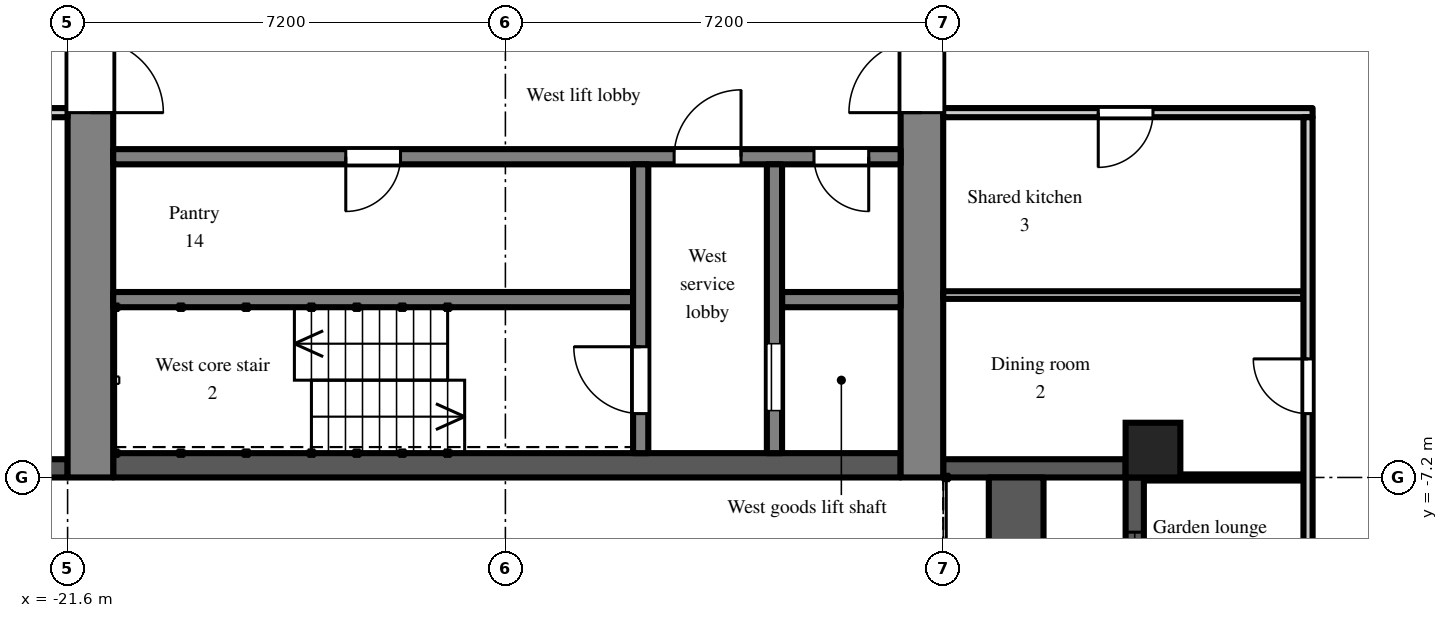
"""IFC4 building model, lengths in metres.
Left out: names, types, materials, properties, quantities, classifications, styles, units other than length and angle.
Written with IfcOpenShell. Run it as: python <this file> out.ifc"""

import sys

from ifc_helpers import new_model, si_unit, direction, frame, frame_2d, origin, origin_2d, place, context, subcontext, project, spatial, rectangle, extrude, element, fill, save


model = new_model("IFC4")
c1 = context("Model", 3, precision=1e-05, world=origin(), true_north=direction((0.0, 1.0)))
c2 = subcontext(c1, "Body", "Model", "MODEL_VIEW")
j1 = project(units=[si_unit("LENGTHUNIT", "METRE"), si_unit("PLANEANGLEUNIT", "RADIAN")], contexts=[c1])
p1 = place(None, origin())
s1 = spatial("IfcSite", under=j1, at=p1, CompositionType="ELEMENT")
p2 = place(p1, origin())
s2 = spatial("IfcBuilding", under=s1, at=p2, CompositionType="ELEMENT")
p3 = place(p2, frame((0.0, 0.0, 216.9)))
s3 = spatial("IfcBuildingStorey", under=s2, at=p3, CompositionType="ELEMENT", Elevation=216.9)
p4 = place(p3, frame((-3.75, -6.75, 0.0), z_axis=(0.0, 0.0, 1.0), x_axis=(1.0, 0.0, 0.0)))
e1 = element("IfcColumn", 1, at=p4, inside=s3, PredefinedType="COLUMN", context=c2, shape_type="SweptSolid", body=[
    extrude(rectangle(XDim=0.9, YDim=0.9, at=origin_2d()), origin(), (0.0, 0.0, 1.0), 3.0),
])
p5 = place(p3, frame((-24.3, -7.05, 0.0), z_axis=(0.0, 0.0, 1.0), x_axis=(1.0, 0.0, 0.0)))
e2 = element("IfcWall", 2, at=p5, inside=s3, PredefinedType="SOLIDWALL", context=c2, shape_type="SweptSolid", body=[
    extrude(rectangle(XDim=2.7, YDim=0.3, at=frame_2d((1.35, 0.0))), origin(), (0.0, 0.0, 1.0), 2.3),
])
p6 = place(p5, frame((0.75, 0.0, 0.2)))
e3 = element("IfcOpeningElement", 3, at=p6, cuts=e2, PredefinedType="OPENING", context=c2, shape_type="SweptSolid", body=[
    extrude(rectangle(XDim=1.2, YDim=1.85, at=frame_2d((0.6, 0.925))), frame((0.0, 0.16, 0.0), z_axis=(0.0, -1.0, 0.0), x_axis=(1.0, 0.0, 0.0)), (0.0, 0.0, 1.0), 0.32),
])
p7 = place(p3, frame((-7.2, -7.05, 0.0), z_axis=(0.0, 0.0, 1.0), x_axis=(1.0, 0.0, 0.0)))
e4 = element("IfcWall", 4, at=p7, inside=s3, PredefinedType="SOLIDWALL", context=c2, shape_type="SweptSolid", body=[
    extrude(rectangle(XDim=3.0, YDim=0.3, at=frame_2d((1.5, 0.0))), origin(), (0.0, 0.0, 1.0), 2.3),
])
p8 = place(p3, frame((-4.05, -7.2, 0.0), z_axis=(0.0, 0.0, 1.0), x_axis=(0.0, -1.0, 0.0)))
e5 = element("IfcWall", 5, at=p8, inside=s3, PredefinedType="SOLIDWALL", context=c2, shape_type="SweptSolid", body=[
    extrude(rectangle(XDim=7.2, YDim=0.3, at=frame_2d((3.6, 0.0))), origin(), (0.0, 0.0, 1.0), 2.3),
])
p9 = place(p8, frame((3.0, 0.0, 0.0)))
e6 = element("IfcOpeningElement", 6, at=p9, cuts=e5, PredefinedType="OPENING", context=c2, shape_type="SweptSolid", body=[
    extrude(rectangle(XDim=1.2, YDim=2.05, at=frame_2d((0.6, 1.025))), frame((0.0, 0.16, 0.0), z_axis=(0.0, -1.0, 0.0), x_axis=(1.0, 0.0, 0.0)), (0.0, 0.0, 1.0), 0.32),
])
p10 = place(p8, frame((0.9, 0.0, 0.2)))
e7 = element("IfcOpeningElement", 7, at=p10, cuts=e5, PredefinedType="OPENING", context=c2, shape_type="SweptSolid", body=[
    extrude(rectangle(XDim=1.8, YDim=1.85, at=frame_2d((0.9, 0.925))), frame((0.0, 0.16, 0.0), z_axis=(0.0, -1.0, 0.0), x_axis=(1.0, 0.0, 0.0)), (0.0, 0.0, 1.0), 0.32),
])
p11 = place(p8, frame((4.5, 0.0, 0.2)))
e8 = element("IfcOpeningElement", 8, at=p11, cuts=e5, PredefinedType="OPENING", context=c2, shape_type="SweptSolid", body=[
    extrude(rectangle(XDim=1.8, YDim=1.85, at=frame_2d((0.9, 0.925))), frame((0.0, 0.16, 0.0), z_axis=(0.0, -1.0, 0.0), x_axis=(1.0, 0.0, 0.0)), (0.0, 0.0, 1.0), 0.32),
])
p12 = place(p3, frame((-6.0, -14.4, 0.0), z_axis=(0.0, 0.0, 1.0), x_axis=(0.0, 1.0, 0.0)))
e9 = element("IfcWall", 9, at=p12, inside=s3, PredefinedType="PARAPET", context=c2, shape_type="SweptSolid", body=[
    extrude(rectangle(XDim=7.2, YDim=0.9, at=frame_2d((3.6, 0.0))), origin(), (0.0, 0.0, 1.0), 0.8),
])
p13 = place(p3, frame((-7.55, -7.2, 0.0), z_axis=(0.0, 0.0, 1.0), x_axis=(0.0, 1.0, 0.0)))
e10 = element("IfcWall", 10, at=p13, inside=s3, PredefinedType="SHEAR", context=c2, shape_type="SweptSolid", body=[
    extrude(rectangle(XDim=14.4, YDim=0.7, at=frame_2d((7.2, 0.0))), origin(), (0.0, 0.0, 1.0), 2.6),
])
p14 = place(p13, frame((6.0, 0.0, 0.0)))
e11 = element("IfcOpeningElement", 11, at=p14, cuts=e10, PredefinedType="OPENING", context=c2, shape_type="SweptSolid", body=[
    extrude(rectangle(XDim=2.4, YDim=2.2, at=frame_2d((1.2, 1.1))), frame((0.0, 0.36, 0.0), z_axis=(0.0, -1.0, 0.0), x_axis=(1.0, 0.0, 0.0)), (0.0, 0.0, 1.0), 0.72),
])
p15 = place(p3, frame((-21.225, -7.2, 0.0), z_axis=(0.0, 0.0, 1.0), x_axis=(0.0, 1.0, 0.0)))
e12 = element("IfcWall", 12, at=p15, inside=s3, PredefinedType="SHEAR", context=c2, shape_type="SweptSolid", body=[
    extrude(rectangle(XDim=14.4, YDim=0.75, at=frame_2d((7.2, 0.0))), origin(), (0.0, 0.0, 1.0), 2.6),
])
p16 = place(p15, frame((6.0, 0.0, 0.0)))
e13 = element("IfcOpeningElement", 13, at=p16, cuts=e12, PredefinedType="OPENING", context=c2, shape_type="SweptSolid", body=[
    extrude(rectangle(XDim=2.4, YDim=2.2, at=frame_2d((1.2, 1.1))), frame((0.0, 0.385, 0.0), z_axis=(0.0, -1.0, 0.0), x_axis=(1.0, 0.0, 0.0)), (0.0, 0.0, 1.0), 0.77),
])
p17 = place(p3, frame((-7.9, -7.0, 0.0), z_axis=(0.0, 0.0, 1.0), x_axis=(-1.0, 0.0, 0.0)))
e14 = element("IfcWall", 14, at=p17, inside=s3, PredefinedType="SHEAR", context=c2, shape_type="SweptSolid", body=[
    extrude(rectangle(XDim=12.95, YDim=0.4, at=frame_2d((6.475, 0.0))), origin(), (0.0, 0.0, 1.0), 2.6),
])
p18 = place(p3, frame((-7.9, -1.925, 0.0), z_axis=(0.0, 0.0, 1.0), x_axis=(-1.0, 0.0, 0.0)))
e15 = element("IfcWall", 15, at=p18, inside=s3, PredefinedType="SHEAR", context=c2, shape_type="SweptSolid", body=[
    extrude(rectangle(XDim=12.95, YDim=0.25, at=frame_2d((6.475, 0.0))), origin(), (0.0, 0.0, 1.0), 2.6),
])
p19 = place(p18, frame((0.525, 0.0, 0.0)))
e16 = element("IfcOpeningElement", 16, at=p19, cuts=e15, PredefinedType="OPENING", context=c2, shape_type="SweptSolid", body=[
    extrude(rectangle(XDim=0.9, YDim=2.1, at=frame_2d((0.45, 1.05))), frame((0.0, 0.135, 0.0), z_axis=(0.0, -1.0, 0.0), x_axis=(1.0, 0.0, 0.0)), (0.0, 0.0, 1.0), 0.27),
])
p20 = place(p18, frame((2.625, 0.0, 0.0)))
e17 = element("IfcOpeningElement", 17, at=p20, cuts=e15, PredefinedType="OPENING", context=c2, shape_type="SweptSolid", body=[
    extrude(rectangle(XDim=1.1, YDim=2.1, at=frame_2d((0.55, 1.05))), frame((0.0, 0.135, 0.0), z_axis=(0.0, -1.0, 0.0), x_axis=(1.0, 0.0, 0.0)), (0.0, 0.0, 1.0), 0.27),
])
p21 = place(p18, frame((8.225, 0.0, 0.0)))
e18 = element("IfcOpeningElement", 18, at=p21, cuts=e15, PredefinedType="OPENING", context=c2, shape_type="SweptSolid", body=[
    extrude(rectangle(XDim=0.9, YDim=2.1, at=frame_2d((0.45, 1.05))), frame((0.0, 0.135, 0.0), z_axis=(0.0, -1.0, 0.0), x_axis=(1.0, 0.0, 0.0)), (0.0, 0.0, 1.0), 0.27),
])
p22 = place(p3, frame((-7.9, -4.275, 0.0), z_axis=(0.0, 0.0, 1.0), x_axis=(-1.0, 0.0, 0.0)))
e19 = element("IfcWall", 19, at=p22, inside=s3, PredefinedType="SHEAR", context=c2, shape_type="SweptSolid", body=[
    extrude(rectangle(XDim=1.95, YDim=0.25, at=frame_2d((0.975, 0.0))), origin(), (0.0, 0.0, 1.0), 2.6),
])
p23 = place(p3, frame((-12.3, -4.275, 0.0), z_axis=(0.0, 0.0, 1.0), x_axis=(-1.0, 0.0, 0.0)))
e20 = element("IfcWall", 20, at=p23, inside=s3, PredefinedType="SHEAR", context=c2, shape_type="SweptSolid", body=[
    extrude(rectangle(XDim=8.55, YDim=0.25, at=frame_2d((4.275, 0.0))), origin(), (0.0, 0.0, 1.0), 2.6),
])
p24 = place(p3, frame((-9.975, -2.05, 0.0), z_axis=(0.0, 0.0, 1.0), x_axis=(0.0, -1.0, 0.0)))
e21 = element("IfcWall", 21, at=p24, inside=s3, PredefinedType="SHEAR", context=c2, shape_type="SweptSolid", body=[
    extrude(rectangle(XDim=4.75, YDim=0.25, at=frame_2d((2.375, 0.0))), origin(), (0.0, 0.0, 1.0), 2.6),
])
p25 = place(p24, frame((2.95, 0.0, 0.0)))
e22 = element("IfcOpeningElement", 22, at=p25, cuts=e21, PredefinedType="OPENING", context=c2, shape_type="SweptSolid", body=[
    extrude(rectangle(XDim=1.1, YDim=2.1, at=frame_2d((0.55, 1.05))), frame((0.0, 0.135, 0.0), z_axis=(0.0, -1.0, 0.0), x_axis=(1.0, 0.0, 0.0)), (0.0, 0.0, 1.0), 0.27),
])
p26 = place(p3, frame((-12.175, -2.05, 0.0), z_axis=(0.0, 0.0, 1.0), x_axis=(0.0, -1.0, 0.0)))
e23 = element("IfcWall", 23, at=p26, inside=s3, PredefinedType="SHEAR", context=c2, shape_type="SweptSolid", body=[
    extrude(rectangle(XDim=4.75, YDim=0.25, at=frame_2d((2.375, 0.0))), origin(), (0.0, 0.0, 1.0), 2.6),
])
p27 = place(p26, frame((3.0, 0.0, 0.0)))
e24 = element("IfcOpeningElement", 24, at=p27, cuts=e23, PredefinedType="OPENING", context=c2, shape_type="SweptSolid", body=[
    extrude(rectangle(XDim=1.1, YDim=2.1, at=frame_2d((0.55, 1.05))), frame((0.0, 0.135, 0.0), z_axis=(0.0, -1.0, 0.0), x_axis=(1.0, 0.0, 0.0)), (0.0, 0.0, 1.0), 0.27),
])
p28 = place(p3, frame((-26.725, -1.2, 0.0), z_axis=(0.0, 0.0, 1.0), x_axis=(1.0, 0.0, 0.0)))
e25 = element("IfcWall", 25, at=p28, inside=s3, PredefinedType="PARTITIONING", context=c2, shape_type="SweptSolid", body=[
    extrude(rectangle(XDim=5.125, YDim=0.15, at=frame_2d((2.562, 0.0))), origin(), (0.0, 0.0, 1.0), 2.6),
])
p29 = place(p28, frame((1.625, 0.0, 0.0)))
e26 = element("IfcOpeningElement", 26, at=p29, cuts=e25, PredefinedType="OPENING", context=c2, shape_type="SweptSolid", body=[
    extrude(rectangle(XDim=1.8, YDim=2.1, at=frame_2d((0.9, 1.05))), frame((0.0, 0.085, 0.0), z_axis=(0.0, -1.0, 0.0), x_axis=(1.0, 0.0, 0.0)), (0.0, 0.0, 1.0), 0.17),
])
p30 = place(p3, frame((-7.2, -4.2, 0.0), z_axis=(0.0, 0.0, 1.0), x_axis=(1.0, 0.0, 0.0)))
e27 = element("IfcWall", 27, at=p30, inside=s3, PredefinedType="PARTITIONING", context=c2, shape_type="SweptSolid", body=[
    extrude(rectangle(XDim=5.925, YDim=0.125, at=frame_2d((2.962, 0.0))), origin(), (0.0, 0.0, 1.0), 2.6),
])
p31 = place(p3, frame((-7.2, -1.2, 0.0), z_axis=(0.0, 0.0, 1.0), x_axis=(1.0, 0.0, 0.0)))
e28 = element("IfcWall", 28, at=p31, inside=s3, PredefinedType="PARTITIONING", context=c2, shape_type="SweptSolid", body=[
    extrude(rectangle(XDim=6.075, YDim=0.15, at=frame_2d((3.038, 0.0))), origin(), (0.0, 0.0, 1.0), 2.6),
])
p32 = place(p31, frame((2.55, 0.0, 0.0)))
e29 = element("IfcOpeningElement", 29, at=p32, cuts=e28, PredefinedType="OPENING", context=c2, shape_type="SweptSolid", body=[
    extrude(rectangle(XDim=0.9, YDim=2.1, at=frame_2d((0.45, 1.05))), frame((0.0, 0.085, 0.0), z_axis=(0.0, -1.0, 0.0), x_axis=(1.0, 0.0, 0.0)), (0.0, 0.0, 1.0), 0.17),
])
p33 = place(p3, frame((-3.9, -7.2, 0.0), z_axis=(0.0, 0.0, 1.0), x_axis=(1.0, 0.0, 0.0)))
e30 = element("IfcWall", 30, at=p33, inside=s3, PredefinedType="PARTITIONING", context=c2, shape_type="SweptSolid", body=[
    extrude(rectangle(XDim=2.625, YDim=0.1, at=frame_2d((1.312, 0.0))), origin(), (0.0, 0.0, 1.0), 2.6),
])
p34 = place(p3, frame((-1.2, -19.525, 0.0), z_axis=(0.0, 0.0, 1.0), x_axis=(0.0, 1.0, 0.0)))
e31 = element("IfcWall", 31, at=p34, inside=s3, PredefinedType="PARTITIONING", context=c2, shape_type="SweptSolid", body=[
    extrude(rectangle(XDim=18.25, YDim=0.15, at=frame_2d((9.125, 0.0))), origin(), (0.0, 0.0, 1.0), 2.6),
])
p35 = place(p34, frame((13.375, 0.0, 0.0)))
e32 = element("IfcOpeningElement", 32, at=p35, cuts=e31, PredefinedType="OPENING", context=c2, shape_type="SweptSolid", body=[
    extrude(rectangle(XDim=0.9, YDim=2.1, at=frame_2d((0.45, 1.05))), frame((0.0, 0.085, 0.0), z_axis=(0.0, -1.0, 0.0), x_axis=(1.0, 0.0, 0.0)), (0.0, 0.0, 1.0), 0.17),
])
p36 = place(p34, frame((6.075, 0.0, 0.0)))
e33 = element("IfcOpeningElement", 33, at=p36, cuts=e31, PredefinedType="OPENING", context=c2, shape_type="SweptSolid", body=[
    extrude(rectangle(XDim=0.9, YDim=2.1, at=frame_2d((0.45, 1.05))), frame((0.0, 0.085, 0.0), z_axis=(0.0, -1.0, 0.0), x_axis=(1.0, 0.0, 0.0)), (0.0, 0.0, 1.0), 0.17),
])
p37 = place(p34, frame((9.675, 0.0, 0.0)))
e34 = element("IfcOpeningElement", 34, at=p37, cuts=e31, PredefinedType="OPENING", context=c2, shape_type="SweptSolid", body=[
    extrude(rectangle(XDim=0.9, YDim=2.1, at=frame_2d((0.45, 1.05))), frame((0.0, 0.085, 0.0), z_axis=(0.0, -1.0, 0.0), x_axis=(1.0, 0.0, 0.0)), (0.0, 0.0, 1.0), 0.17),
])
p38 = place(p34, frame((3.925, 0.0, 0.0)))
e35 = element("IfcOpeningElement", 35, at=p38, cuts=e31, PredefinedType="OPENING", context=c2, shape_type="SweptSolid", body=[
    extrude(rectangle(XDim=1.0, YDim=2.1, at=frame_2d((0.5, 1.05))), frame((0.0, 0.085, 0.0), z_axis=(0.0, -1.0, 0.0), x_axis=(1.0, 0.0, 0.0)), (0.0, 0.0, 1.0), 0.17),
])
p39 = place(p34, frame((0.275, 0.0, 0.0)))
e36 = element("IfcOpeningElement", 36, at=p39, cuts=e31, PredefinedType="OPENING", context=c2, shape_type="SweptSolid", body=[
    extrude(rectangle(XDim=0.9, YDim=2.1, at=frame_2d((0.45, 1.05))), frame((0.0, 0.085, 0.0), z_axis=(0.0, -1.0, 0.0), x_axis=(1.0, 0.0, 0.0)), (0.0, 0.0, 1.0), 0.17),
])
p40 = place(p10, origin())
e37 = element("IfcWindow", 37, at=p40, inside=s3, PartitioningType="SINGLE_PANEL", PredefinedType="WINDOW", context=c2, shape_type="SweptSolid", body=[
    extrude(rectangle(XDim=1.8, YDim=1.85, at=frame_2d((0.9, 0.925))), frame((0.0, 0.03, 0.0), z_axis=(0.0, -1.0, 0.0), x_axis=(1.0, 0.0, 0.0)), (0.0, 0.0, 1.0), 0.06),
])
fill(e7, e37)
p41 = place(p25, origin())
e38 = element("IfcDoor", 38, at=p41, inside=s3, OperationType="SLIDING_TO_LEFT", PredefinedType="DOOR", context=c2, shape_type="SweptSolid", body=[
    extrude(rectangle(XDim=1.1, YDim=2.1, at=frame_2d((0.55, 1.05))), frame((0.0, 0.025, 0.0), z_axis=(0.0, -1.0, 0.0), x_axis=(1.0, 0.0, 0.0)), (0.0, 0.0, 1.0), 0.05),
])
fill(e22, e38)
p42 = place(p27, frame((1.1, 0.0, 0.0), z_axis=(0.0, 0.0, 1.0), x_axis=(-1.0, 0.0, 0.0)))
e39 = element("IfcDoor", 39, at=p42, inside=s3, OperationType="SINGLE_SWING_RIGHT", PredefinedType="DOOR", context=c2, shape_type="SweptSolid", body=[
    extrude(rectangle(XDim=1.1, YDim=2.1, at=frame_2d((0.55, 1.05))), frame((0.0, 0.025, 0.0), z_axis=(0.0, -1.0, 0.0), x_axis=(1.0, 0.0, 0.0)), (0.0, 0.0, 1.0), 0.05),
])
fill(e24, e39)
p43 = place(p19, origin())
e40 = element("IfcDoor", 40, at=p43, inside=s3, OperationType="SINGLE_SWING_LEFT", PredefinedType="DOOR", context=c2, shape_type="SweptSolid", body=[
    extrude(rectangle(XDim=0.9, YDim=2.1, at=frame_2d((0.45, 1.05))), frame((0.0, 0.025, 0.0), z_axis=(0.0, -1.0, 0.0), x_axis=(1.0, 0.0, 0.0)), (0.0, 0.0, 1.0), 0.05),
])
fill(e16, e40)
p44 = place(p20, frame((1.1, 0.0, 0.0), z_axis=(0.0, 0.0, 1.0), x_axis=(-1.0, 0.0, 0.0)))
e41 = element("IfcDoor", 41, at=p44, inside=s3, OperationType="SINGLE_SWING_RIGHT", PredefinedType="DOOR", context=c2, shape_type="SweptSolid", body=[
    extrude(rectangle(XDim=1.1, YDim=2.1, at=frame_2d((0.55, 1.05))), frame((0.0, 0.025, 0.0), z_axis=(0.0, -1.0, 0.0), x_axis=(1.0, 0.0, 0.0)), (0.0, 0.0, 1.0), 0.05),
])
fill(e17, e41)
p45 = place(p14, origin())
e42 = element("IfcDoor", 42, at=p45, inside=s3, OperationType="DOUBLE_DOOR_DOUBLE_SWING", PredefinedType="DOOR", context=c2, shape_type="SweptSolid", body=[
    extrude(rectangle(XDim=2.4, YDim=2.2, at=frame_2d((1.2, 1.1))), frame((0.0, 0.025, 0.0), z_axis=(0.0, -1.0, 0.0), x_axis=(1.0, 0.0, 0.0)), (0.0, 0.0, 1.0), 0.05),
])
fill(e11, e42)
p46 = place(p16, frame((2.4, 0.0, 0.0), z_axis=(0.0, 0.0, 1.0), x_axis=(-1.0, 0.0, 0.0)))
e43 = element("IfcDoor", 43, at=p46, inside=s3, OperationType="DOUBLE_DOOR_DOUBLE_SWING", PredefinedType="DOOR", context=c2, shape_type="SweptSolid", body=[
    extrude(rectangle(XDim=2.4, YDim=2.2, at=frame_2d((1.2, 1.1))), frame((0.0, 0.025, 0.0), z_axis=(0.0, -1.0, 0.0), x_axis=(1.0, 0.0, 0.0)), (0.0, 0.0, 1.0), 0.05),
])
fill(e13, e43)
p47 = place(p21, origin())
e44 = element("IfcDoor", 44, at=p47, inside=s3, OperationType="SINGLE_SWING_RIGHT", PredefinedType="DOOR", context=c2, shape_type="SweptSolid", body=[
    extrude(rectangle(XDim=0.9, YDim=2.1, at=frame_2d((0.45, 1.05))), frame((0.0, 0.025, 0.0), z_axis=(0.0, -1.0, 0.0), x_axis=(1.0, 0.0, 0.0)), (0.0, 0.0, 1.0), 0.05),
])
fill(e18, e44)
p48 = place(p32, frame((0.9, 0.0, 0.0), z_axis=(0.0, 0.0, 1.0), x_axis=(-1.0, 0.0, 0.0)))
e45 = element("IfcDoor", 45, at=p48, inside=s3, OperationType="SINGLE_SWING_RIGHT", PredefinedType="DOOR", context=c2, shape_type="SweptSolid", body=[
    extrude(rectangle(XDim=0.9, YDim=2.1, at=frame_2d((0.45, 1.05))), frame((0.0, 0.025, 0.0), z_axis=(0.0, -1.0, 0.0), x_axis=(1.0, 0.0, 0.0)), (0.0, 0.0, 1.0), 0.05),
])
fill(e29, e45)
p49 = place(p35, origin())
e46 = element("IfcDoor", 46, at=p49, inside=s3, OperationType="SINGLE_SWING_RIGHT", PredefinedType="DOOR", context=c2, shape_type="SweptSolid", body=[
    extrude(rectangle(XDim=0.9, YDim=2.1, at=frame_2d((0.45, 1.05))), frame((0.0, 0.025, 0.0), z_axis=(0.0, -1.0, 0.0), x_axis=(1.0, 0.0, 0.0)), (0.0, 0.0, 1.0), 0.05),
])
fill(e32, e46)
save(model, sys.argv[1])
